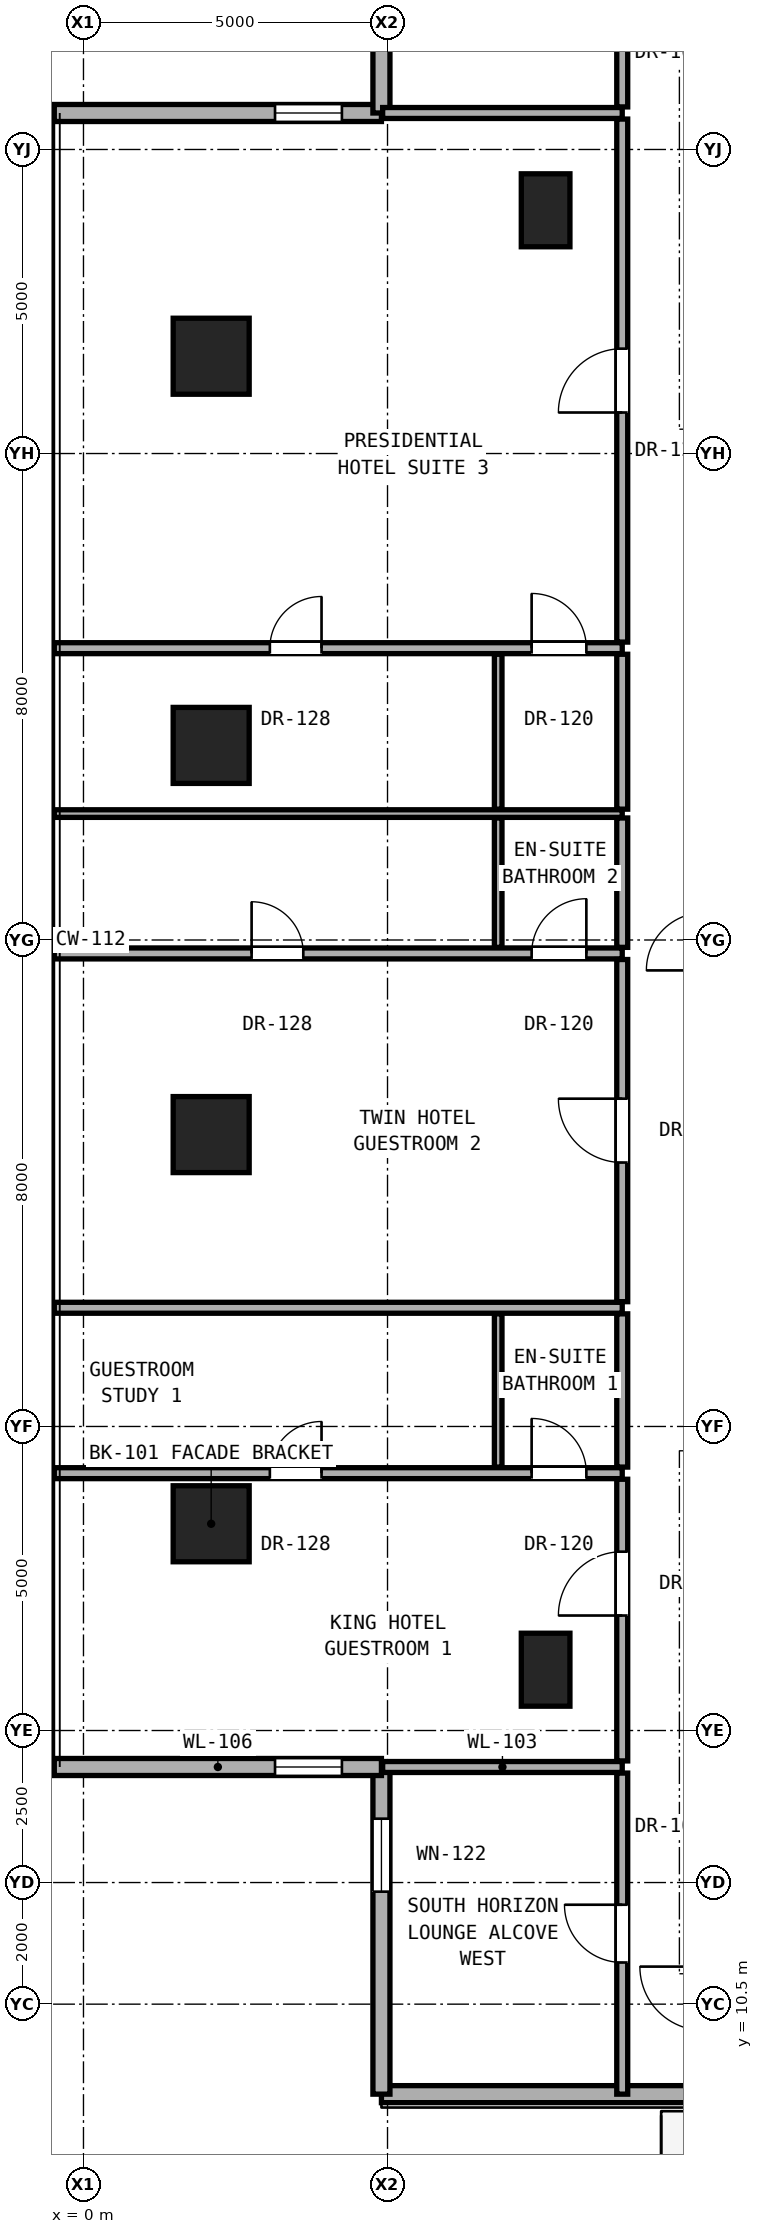
"""IFC4 building model, lengths in metres.
Left out: names, types, materials, properties, quantities, classifications, styles, units other than length and angle.
Written with IfcOpenShell. Run it as: python <this file> out.ifc"""

import sys

from ifc_helpers import new_model, si_unit, direction, frame, frame_2d, origin, origin_2d, place, context, subcontext, project, spatial, rectangle, hollow_rectangle, extrude, element, fill, save


model = new_model("IFC4")
c1 = context("Model", 3, precision=1e-05, world=origin(), true_north=direction((0.0, 1.0)))
c2 = subcontext(c1, "Body", "Model", "MODEL_VIEW")
j1 = project(units=[si_unit("LENGTHUNIT", "METRE"), si_unit("PLANEANGLEUNIT", "RADIAN")], contexts=[c1])
p1 = place(None, origin())
s1 = spatial("IfcSite", under=j1, at=p1, CompositionType="ELEMENT")
p2 = place(p1, origin())
s2 = spatial("IfcBuilding", under=s1, at=p2, CompositionType="ELEMENT")
p3 = place(p2, frame((0.0, 0.0, 22.4)))
s3 = spatial("IfcBuildingStorey", under=s2, at=p3, CompositionType="ELEMENT", Elevation=22.4)
for number, where, z_axis, x_axis in (
    (1, (2.1, 18.4, 0.0), (0.0, 0.0, 1.0), (1.0, 0.0, 0.0)),
    (2, (2.1, 24.8, 0.0), (0.0, 0.0, 1.0), (1.0, 0.0, 0.0)),
    (3, (2.1, 31.2, 0.0), (0.0, 0.0, 1.0), (1.0, 0.0, 0.0)),
    (4, (2.1, 37.6, 0.0), (0.0, 0.0, 1.0), (1.0, 0.0, 0.0)),
):
    element("IfcColumn", number, at=place(p3, frame(where, z_axis=z_axis, x_axis=x_axis)), inside=s3, PredefinedType="COLUMN", context=c2, shape_type="SweptSolid", body=[
        extrude(hollow_rectangle(XDim=1.25, YDim=1.25, WallThickness=0.07, at=origin_2d()), origin(), (0.0, 0.0, 1.0), 3.3),
    ])
for number, where, z_axis, x_axis in (
    (5, (7.6, 16.0, 0.0), (0.0, 0.0, 1.0), (1.0, 0.0, 0.0)),
    (6, (7.6, 40.0, 0.0), (0.0, 0.0, 1.0), (1.0, 0.0, 0.0)),
):
    element("IfcColumn", number, at=place(p3, frame(where, z_axis=z_axis, x_axis=x_axis)), inside=s3, PredefinedType="PILASTER", context=c2, shape_type="SweptSolid", body=[
        extrude(rectangle(XDim=0.8, YDim=1.2, at=origin_2d()), origin(), (0.0, 0.0, 1.0), 3.3),
    ])
p4 = place(p3, frame((17.7, 9.02, 0.0), z_axis=(0.0, 0.0, 1.0), x_axis=(-1.0, 0.0, 0.0)))
e7 = element("IfcWall", 7, at=p4, inside=s3, PredefinedType="SOLIDWALL", context=c2, shape_type="SweptSolid", body=[
    extrude(rectangle(XDim=12.8, YDim=0.28, at=frame_2d((6.4, 0.0))), origin(), (0.0, 0.0, 1.0), 3.04),
])
p5 = place(p4, frame((1.4, 0.0, 0.0)))
e8 = element("IfcOpeningElement", 8, at=p5, cuts=e7, PredefinedType="OPENING", context=c2, shape_type="SweptSolid", body=[
    extrude(rectangle(XDim=1.0, YDim=2.15, at=frame_2d((0.5, 1.075))), frame((0.0, 0.15, 0.0), z_axis=(0.0, -1.0, 0.0), x_axis=(1.0, 0.0, 0.0)), (0.0, 0.0, 1.0), 0.3),
])
p6 = place(p3, frame((4.9, 14.4, 0.0), z_axis=(0.0, 0.0, 1.0), x_axis=(0.0, -1.0, 0.0)))
e9 = element("IfcWall", 9, at=p6, inside=s3, PredefinedType="SOLIDWALL", context=c2, shape_type="SweptSolid", body=[
    extrude(rectangle(XDim=5.38, YDim=0.28, at=frame_2d((2.69, 0.0))), origin(), (0.0, 0.0, 1.0), 3.04),
])
p7 = place(p6, frame((0.85, 0.0, 0.79)))
e10 = element("IfcOpeningElement", 10, at=p7, cuts=e9, PredefinedType="OPENING", context=c2, shape_type="SweptSolid", body=[
    extrude(rectangle(XDim=1.2, YDim=2.1, at=frame_2d((0.6, 1.05))), frame((0.0, 0.15, 0.0), z_axis=(0.0, -1.0, 0.0), x_axis=(1.0, 0.0, 0.0)), (0.0, 0.0, 1.0), 0.3),
])
p8 = place(p3, frame((-0.48, 14.4, 0.0), z_axis=(0.0, 0.0, 1.0), x_axis=(1.0, 0.0, 0.0)))
e11 = element("IfcWall", 11, at=p8, inside=s3, PredefinedType="SOLIDWALL", context=c2, shape_type="SweptSolid", body=[
    extrude(rectangle(XDim=5.38, YDim=0.28, at=frame_2d((2.69, 0.0))), origin(), (0.0, 0.0, 1.0), 3.04),
])
p9 = place(p8, frame((3.63, 0.0, 0.85)))
e12 = element("IfcOpeningElement", 12, at=p9, cuts=e11, PredefinedType="OPENING", context=c2, shape_type="SweptSolid", body=[
    extrude(rectangle(XDim=1.1, YDim=2.0, at=frame_2d((0.55, 1.0))), frame((0.0, 0.15, 0.0), z_axis=(0.0, -1.0, 0.0), x_axis=(1.0, 0.0, 0.0)), (0.0, 0.0, 1.0), 0.3),
])
p10 = place(p3, frame((4.9, 41.6, 0.0), z_axis=(0.0, 0.0, 1.0), x_axis=(-1.0, 0.0, 0.0)))
e13 = element("IfcWall", 13, at=p10, inside=s3, PredefinedType="SOLIDWALL", context=c2, shape_type="SweptSolid", body=[
    extrude(rectangle(XDim=5.38, YDim=0.28, at=frame_2d((2.69, 0.0))), origin(), (0.0, 0.0, 1.0), 3.04),
])
p11 = place(p10, frame((0.65, 0.0, 0.85)))
e14 = element("IfcOpeningElement", 14, at=p11, cuts=e13, PredefinedType="OPENING", context=c2, shape_type="SweptSolid", body=[
    extrude(rectangle(XDim=1.1, YDim=2.0, at=frame_2d((0.55, 1.0))), frame((0.0, 0.15, 0.0), z_axis=(0.0, -1.0, 0.0), x_axis=(1.0, 0.0, 0.0)), (0.0, 0.0, 1.0), 0.3),
])
p12 = place(p3, frame((4.9, 46.98, 0.0), z_axis=(0.0, 0.0, 1.0), x_axis=(0.0, -1.0, 0.0)))
e15 = element("IfcWall", 15, at=p12, inside=s3, PredefinedType="SOLIDWALL", context=c2, shape_type="SweptSolid", body=[
    extrude(rectangle(XDim=5.38, YDim=0.28, at=frame_2d((2.69, 0.0))), origin(), (0.0, 0.0, 1.0), 3.04),
])
p13 = place(p3, frame((4.92, 14.4, 0.0), z_axis=(0.0, 0.0, 1.0), x_axis=(1.0, 0.0, 0.0)))
e16 = element("IfcWall", 16, at=p13, inside=s3, PredefinedType="PARTITIONING", context=c2, shape_type="SweptSolid", body=[
    extrude(rectangle(XDim=3.94, YDim=0.18, at=frame_2d((1.97, 0.0))), origin(), (0.0, 0.0, 1.0), 3.06),
])
p14 = place(p3, frame((-0.48, 19.232, 0.0), z_axis=(0.0, 0.0, 1.0), x_axis=(1.0, 0.0, 0.0)))
e17 = element("IfcWall", 17, at=p14, inside=s3, PredefinedType="PARTITIONING", context=c2, shape_type="SweptSolid", body=[
    extrude(rectangle(XDim=9.34, YDim=0.18, at=frame_2d((4.67, 0.0))), origin(), (0.0, 0.0, 1.0), 2.125),
])
p15 = place(p14, frame((3.545, 0.0, 0.0)))
e18 = element("IfcOpeningElement", 18, at=p15, cuts=e17, PredefinedType="OPENING", context=c2, shape_type="SweptSolid", body=[
    extrude(rectangle(XDim=0.85, YDim=2.01, at=frame_2d((0.425, 1.005))), frame((0.0, 0.1, 0.0), z_axis=(0.0, -1.0, 0.0), x_axis=(1.0, 0.0, 0.0)), (0.0, 0.0, 1.0), 0.2),
])
p16 = place(p14, frame((7.85, 0.0, 0.0)))
e19 = element("IfcOpeningElement", 19, at=p16, cuts=e17, PredefinedType="OPENING", context=c2, shape_type="SweptSolid", body=[
    extrude(rectangle(XDim=0.9, YDim=2.1, at=frame_2d((0.45, 1.05))), frame((0.0, 0.1, 0.0), z_axis=(0.0, -1.0, 0.0), x_axis=(1.0, 0.0, 0.0)), (0.0, 0.0, 1.0), 0.2),
])
p17 = place(p3, frame((-0.48, 21.952, 0.0), z_axis=(0.0, 0.0, 1.0), x_axis=(1.0, 0.0, 0.0)))
e20 = element("IfcWall", 20, at=p17, inside=s3, PredefinedType="PARTITIONING", context=c2, shape_type="SweptSolid", body=[
    extrude(rectangle(XDim=9.34, YDim=0.18, at=frame_2d((4.67, 0.0))), origin(), (0.0, 0.0, 1.0), 2.125),
])
p18 = place(p3, frame((-0.48, 27.779, 0.0), z_axis=(0.0, 0.0, 1.0), x_axis=(1.0, 0.0, 0.0)))
e21 = element("IfcWall", 21, at=p18, inside=s3, PredefinedType="PARTITIONING", context=c2, shape_type="SweptSolid", body=[
    extrude(rectangle(XDim=9.34, YDim=0.18, at=frame_2d((4.67, 0.0))), origin(), (0.0, 0.0, 1.0), 2.125),
])
p19 = place(p18, frame((3.245, 0.0, 0.0)))
e22 = element("IfcOpeningElement", 22, at=p19, cuts=e21, PredefinedType="OPENING", context=c2, shape_type="SweptSolid", body=[
    extrude(rectangle(XDim=0.85, YDim=2.01, at=frame_2d((0.425, 1.005))), frame((0.0, 0.1, 0.0), z_axis=(0.0, -1.0, 0.0), x_axis=(1.0, 0.0, 0.0)), (0.0, 0.0, 1.0), 0.2),
])
p20 = place(p18, frame((7.85, 0.0, 0.0)))
e23 = element("IfcOpeningElement", 23, at=p20, cuts=e21, PredefinedType="OPENING", context=c2, shape_type="SweptSolid", body=[
    extrude(rectangle(XDim=0.9, YDim=2.1, at=frame_2d((0.45, 1.05))), frame((0.0, 0.1, 0.0), z_axis=(0.0, -1.0, 0.0), x_axis=(1.0, 0.0, 0.0)), (0.0, 0.0, 1.0), 0.2),
])
p21 = place(p3, frame((-0.48, 30.079, 0.0), z_axis=(0.0, 0.0, 1.0), x_axis=(1.0, 0.0, 0.0)))
e24 = element("IfcWall", 24, at=p21, inside=s3, PredefinedType="PARTITIONING", context=c2, shape_type="SweptSolid", body=[
    extrude(rectangle(XDim=9.34, YDim=0.125, at=frame_2d((4.67, 0.0))), origin(), (0.0, 0.0, 1.0), 2.125),
])
p22 = place(p3, frame((-0.48, 32.799, 0.0), z_axis=(0.0, 0.0, 1.0), x_axis=(1.0, 0.0, 0.0)))
e25 = element("IfcWall", 25, at=p22, inside=s3, PredefinedType="PARTITIONING", context=c2, shape_type="SweptSolid", body=[
    extrude(rectangle(XDim=9.34, YDim=0.18, at=frame_2d((4.67, 0.0))), origin(), (0.0, 0.0, 1.0), 2.125),
])
p23 = place(p22, frame((3.545, 0.0, 0.0)))
e26 = element("IfcOpeningElement", 26, at=p23, cuts=e25, PredefinedType="OPENING", context=c2, shape_type="SweptSolid", body=[
    extrude(rectangle(XDim=0.85, YDim=2.01, at=frame_2d((0.425, 1.005))), frame((0.0, 0.1, 0.0), z_axis=(0.0, -1.0, 0.0), x_axis=(1.0, 0.0, 0.0)), (0.0, 0.0, 1.0), 0.2),
])
p24 = place(p22, frame((7.85, 0.0, 0.0)))
e27 = element("IfcOpeningElement", 27, at=p24, cuts=e25, PredefinedType="OPENING", context=c2, shape_type="SweptSolid", body=[
    extrude(rectangle(XDim=0.9, YDim=2.1, at=frame_2d((0.45, 1.05))), frame((0.0, 0.1, 0.0), z_axis=(0.0, -1.0, 0.0), x_axis=(1.0, 0.0, 0.0)), (0.0, 0.0, 1.0), 0.2),
])
p25 = place(p3, frame((4.92, 41.6, 0.0), z_axis=(0.0, 0.0, 1.0), x_axis=(1.0, 0.0, 0.0)))
e28 = element("IfcWall", 28, at=p25, inside=s3, PredefinedType="PARTITIONING", context=c2, shape_type="SweptSolid", body=[
    extrude(rectangle(XDim=3.94, YDim=0.18, at=frame_2d((1.97, 0.0))), origin(), (0.0, 0.0, 1.0), 3.06),
])
p26 = place(p3, frame((6.82, 19.332, 0.0), z_axis=(0.0, 0.0, 1.0), x_axis=(0.0, 1.0, 0.0)))
e29 = element("IfcWall", 29, at=p26, inside=s3, PredefinedType="PARTITIONING", context=c2, shape_type="SweptSolid", body=[
    extrude(rectangle(XDim=2.52, YDim=0.125, at=frame_2d((1.26, 0.0))), origin(), (0.0, 0.0, 1.0), 3.06),
])
p27 = place(p3, frame((6.82, 27.879, 0.0), z_axis=(0.0, 0.0, 1.0), x_axis=(0.0, 1.0, 0.0)))
e30 = element("IfcWall", 30, at=p27, inside=s3, PredefinedType="PARTITIONING", context=c2, shape_type="SweptSolid", body=[
    extrude(rectangle(XDim=2.128, YDim=0.125, at=frame_2d((1.064, 0.0))), origin(), (0.0, 0.0, 1.0), 3.06),
])
p28 = place(p3, frame((6.82, 30.152, 0.0), z_axis=(0.0, 0.0, 1.0), x_axis=(0.0, 1.0, 0.0)))
e31 = element("IfcWall", 31, at=p28, inside=s3, PredefinedType="PARTITIONING", context=c2, shape_type="SweptSolid", body=[
    extrude(rectangle(XDim=2.547, YDim=0.125, at=frame_2d((1.274, 0.0))), origin(), (0.0, 0.0, 1.0), 2.279),
])
p29 = place(p3, frame((8.86, 9.02, 0.0), z_axis=(0.0, 0.0, 1.0), x_axis=(0.0, 1.0, 0.0)))
e32 = element("IfcWall", 32, at=p29, inside=s3, PredefinedType="PARTITIONING", context=c2, shape_type="SweptSolid", body=[
    extrude(rectangle(XDim=5.28, YDim=0.18, at=frame_2d((2.64, 0.0))), origin(), (0.0, 0.0, 1.0), 3.06),
])
p30 = place(p29, frame((2.165, 0.0, 0.0)))
e33 = element("IfcOpeningElement", 33, at=p30, cuts=e32, PredefinedType="OPENING", context=c2, shape_type="SweptSolid", body=[
    extrude(rectangle(XDim=0.95, YDim=2.15, at=frame_2d((0.475, 1.075))), frame((0.0, 0.1, 0.0), z_axis=(0.0, -1.0, 0.0), x_axis=(1.0, 0.0, 0.0)), (0.0, 0.0, 1.0), 0.2),
])
p31 = place(p3, frame((8.86, 14.5, 0.0), z_axis=(0.0, 0.0, 1.0), x_axis=(0.0, 1.0, 0.0)))
e34 = element("IfcWall", 34, at=p31, inside=s3, PredefinedType="PARTITIONING", context=c2, shape_type="SweptSolid", body=[
    extrude(rectangle(XDim=4.632, YDim=0.18, at=frame_2d((2.316, 0.0))), origin(), (0.0, 0.0, 1.0), 2.436),
])
p32 = place(p31, frame((2.391, 0.0, 0.0)))
e35 = element("IfcOpeningElement", 35, at=p32, cuts=e34, PredefinedType="OPENING", context=c2, shape_type="SweptSolid", body=[
    extrude(rectangle(XDim=1.05, YDim=2.2, at=frame_2d((0.525, 1.1))), frame((0.0, 0.1, 0.0), z_axis=(0.0, -1.0, 0.0), x_axis=(1.0, 0.0, 0.0)), (0.0, 0.0, 1.0), 0.2),
])
p33 = place(p3, frame((8.86, 19.332, 0.0), z_axis=(0.0, 0.0, 1.0), x_axis=(0.0, 1.0, 0.0)))
e36 = element("IfcWall", 36, at=p33, inside=s3, PredefinedType="PARTITIONING", context=c2, shape_type="SweptSolid", body=[
    extrude(rectangle(XDim=2.52, YDim=0.18, at=frame_2d((1.26, 0.0))), origin(), (0.0, 0.0, 1.0), 3.06),
])
p34 = place(p3, frame((8.86, 22.052, 0.0), z_axis=(0.0, 0.0, 1.0), x_axis=(0.0, 1.0, 0.0)))
e37 = element("IfcWall", 37, at=p34, inside=s3, PredefinedType="PARTITIONING", context=c2, shape_type="SweptSolid", body=[
    extrude(rectangle(XDim=5.627, YDim=0.18, at=frame_2d((2.813, 0.0))), origin(), (0.0, 0.0, 1.0), 2.279),
])
p35 = place(p34, frame((2.289, 0.0, 0.0)))
e38 = element("IfcOpeningElement", 38, at=p35, cuts=e37, PredefinedType="OPENING", context=c2, shape_type="SweptSolid", body=[
    extrude(rectangle(XDim=1.05, YDim=2.2, at=frame_2d((0.525, 1.1))), frame((0.0, 0.1, 0.0), z_axis=(0.0, -1.0, 0.0), x_axis=(1.0, 0.0, 0.0)), (0.0, 0.0, 1.0), 0.2),
])
p36 = place(p3, frame((8.86, 27.879, 0.0), z_axis=(0.0, 0.0, 1.0), x_axis=(0.0, 1.0, 0.0)))
e39 = element("IfcWall", 39, at=p36, inside=s3, PredefinedType="PARTITIONING", context=c2, shape_type="SweptSolid", body=[
    extrude(rectangle(XDim=2.128, YDim=0.18, at=frame_2d((1.064, 0.0))), origin(), (0.0, 0.0, 1.0), 3.06),
])
p37 = place(p3, frame((8.86, 30.152, 0.0), z_axis=(0.0, 0.0, 1.0), x_axis=(0.0, 1.0, 0.0)))
e40 = element("IfcWall", 40, at=p37, inside=s3, PredefinedType="PARTITIONING", context=c2, shape_type="SweptSolid", body=[
    extrude(rectangle(XDim=2.547, YDim=0.18, at=frame_2d((1.274, 0.0))), origin(), (0.0, 0.0, 1.0), 2.279),
])
p38 = place(p3, frame((8.86, 32.899, 0.0), z_axis=(0.0, 0.0, 1.0), x_axis=(0.0, 1.0, 0.0)))
e41 = element("IfcWall", 41, at=p38, inside=s3, PredefinedType="PARTITIONING", context=c2, shape_type="SweptSolid", body=[
    extrude(rectangle(XDim=8.601, YDim=0.18, at=frame_2d((4.301, 0.0))), origin(), (0.0, 0.0, 1.0), 2.436),
])
p39 = place(p38, frame((3.775, 0.0, 0.0)))
e42 = element("IfcOpeningElement", 42, at=p39, cuts=e41, PredefinedType="OPENING", context=c2, shape_type="SweptSolid", body=[
    extrude(rectangle(XDim=1.05, YDim=2.2, at=frame_2d((0.525, 1.1))), frame((0.0, 0.1, 0.0), z_axis=(0.0, -1.0, 0.0), x_axis=(1.0, 0.0, 0.0)), (0.0, 0.0, 1.0), 0.2),
])
p40 = place(p3, frame((8.86, 41.7, 0.0), z_axis=(0.0, 0.0, 1.0), x_axis=(0.0, 1.0, 0.0)))
e43 = element("IfcWall", 43, at=p40, inside=s3, PredefinedType="PARTITIONING", context=c2, shape_type="SweptSolid", body=[
    extrude(rectangle(XDim=5.28, YDim=0.18, at=frame_2d((2.64, 0.0))), origin(), (0.0, 0.0, 1.0), 3.06),
])
p41 = place(p40, frame((2.165, 0.0, 0.0)))
e44 = element("IfcOpeningElement", 44, at=p41, cuts=e43, PredefinedType="OPENING", context=c2, shape_type="SweptSolid", body=[
    extrude(rectangle(XDim=0.95, YDim=2.15, at=frame_2d((0.475, 1.075))), frame((0.0, 0.1, 0.0), z_axis=(0.0, -1.0, 0.0), x_axis=(1.0, 0.0, 0.0)), (0.0, 0.0, 1.0), 0.2),
])
p42 = place(p7, origin())
e45 = element("IfcWindow", 45, at=p42, inside=s3, PartitioningType="SINGLE_PANEL", PredefinedType="WINDOW", context=c2, shape_type="SweptSolid", body=[
    extrude(rectangle(XDim=1.2, YDim=2.1, at=frame_2d((0.6, 1.05))), frame((0.0, 0.03, 0.0), z_axis=(0.0, -1.0, 0.0), x_axis=(1.0, 0.0, 0.0)), (0.0, 0.0, 1.0), 0.06),
])
fill(e10, e45)
p43 = place(p9, origin())
e46 = element("IfcWindow", 46, at=p43, inside=s3, PartitioningType="SINGLE_PANEL", PredefinedType="WINDOW", context=c2, shape_type="SweptSolid", body=[
    extrude(rectangle(XDim=1.1, YDim=2.0, at=frame_2d((0.55, 1.0))), frame((0.0, 0.03, 0.0), z_axis=(0.0, -1.0, 0.0), x_axis=(1.0, 0.0, 0.0)), (0.0, 0.0, 1.0), 0.06),
])
fill(e12, e46)
p44 = place(p11, origin())
e47 = element("IfcWindow", 47, at=p44, inside=s3, PartitioningType="SINGLE_PANEL", PredefinedType="WINDOW", context=c2, shape_type="SweptSolid", body=[
    extrude(rectangle(XDim=1.1, YDim=2.0, at=frame_2d((0.55, 1.0))), frame((0.0, 0.03, 0.0), z_axis=(0.0, -1.0, 0.0), x_axis=(1.0, 0.0, 0.0)), (0.0, 0.0, 1.0), 0.06),
])
fill(e14, e47)
p45 = place(p32, origin())
e48 = element("IfcDoor", 48, at=p45, inside=s3, OperationType="SINGLE_SWING_LEFT", PredefinedType="DOOR", context=c2, shape_type="SweptSolid", body=[
    extrude(rectangle(XDim=1.05, YDim=2.2, at=frame_2d((0.525, 1.1))), frame((0.0, 0.025, 0.0), z_axis=(0.0, -1.0, 0.0), x_axis=(1.0, 0.0, 0.0)), (0.0, 0.0, 1.0), 0.05),
])
fill(e35, e48)
p46 = place(p15, origin())
e49 = element("IfcDoor", 49, at=p46, inside=s3, OperationType="SINGLE_SWING_RIGHT", PredefinedType="DOOR", context=c2, shape_type="SweptSolid", body=[
    extrude(rectangle(XDim=0.85, YDim=2.01, at=frame_2d((0.425, 1.005))), frame((0.0, 0.025, 0.0), z_axis=(0.0, -1.0, 0.0), x_axis=(1.0, 0.0, 0.0)), (0.0, 0.0, 1.0), 0.05),
])
fill(e18, e49)
p47 = place(p16, origin())
e50 = element("IfcDoor", 50, at=p47, inside=s3, OperationType="SINGLE_SWING_LEFT", PredefinedType="DOOR", context=c2, shape_type="SweptSolid", body=[
    extrude(rectangle(XDim=0.9, YDim=2.1, at=frame_2d((0.45, 1.05))), frame((0.0, 0.025, 0.0), z_axis=(0.0, -1.0, 0.0), x_axis=(1.0, 0.0, 0.0)), (0.0, 0.0, 1.0), 0.05),
])
fill(e19, e50)
p48 = place(p35, origin())
e51 = element("IfcDoor", 51, at=p48, inside=s3, OperationType="SINGLE_SWING_RIGHT", PredefinedType="DOOR", context=c2, shape_type="SweptSolid", body=[
    extrude(rectangle(XDim=1.05, YDim=2.2, at=frame_2d((0.525, 1.1))), frame((0.0, 0.025, 0.0), z_axis=(0.0, -1.0, 0.0), x_axis=(1.0, 0.0, 0.0)), (0.0, 0.0, 1.0), 0.05),
])
fill(e38, e51)
p49 = place(p19, origin())
e52 = element("IfcDoor", 52, at=p49, inside=s3, OperationType="SINGLE_SWING_LEFT", PredefinedType="DOOR", context=c2, shape_type="SweptSolid", body=[
    extrude(rectangle(XDim=0.85, YDim=2.01, at=frame_2d((0.425, 1.005))), frame((0.0, 0.025, 0.0), z_axis=(0.0, -1.0, 0.0), x_axis=(1.0, 0.0, 0.0)), (0.0, 0.0, 1.0), 0.05),
])
fill(e22, e52)
p50 = place(p20, origin())
e53 = element("IfcDoor", 53, at=p50, inside=s3, OperationType="SINGLE_SWING_RIGHT", PredefinedType="DOOR", context=c2, shape_type="SweptSolid", body=[
    extrude(rectangle(XDim=0.9, YDim=2.1, at=frame_2d((0.45, 1.05))), frame((0.0, 0.025, 0.0), z_axis=(0.0, -1.0, 0.0), x_axis=(1.0, 0.0, 0.0)), (0.0, 0.0, 1.0), 0.05),
])
fill(e23, e53)
p51 = place(p39, origin())
e54 = element("IfcDoor", 54, at=p51, inside=s3, OperationType="SINGLE_SWING_LEFT", PredefinedType="DOOR", context=c2, shape_type="SweptSolid", body=[
    extrude(rectangle(XDim=1.05, YDim=2.2, at=frame_2d((0.525, 1.1))), frame((0.0, 0.025, 0.0), z_axis=(0.0, -1.0, 0.0), x_axis=(1.0, 0.0, 0.0)), (0.0, 0.0, 1.0), 0.05),
])
fill(e42, e54)
p52 = place(p23, origin())
e55 = element("IfcDoor", 55, at=p52, inside=s3, OperationType="SINGLE_SWING_RIGHT", PredefinedType="DOOR", context=c2, shape_type="SweptSolid", body=[
    extrude(rectangle(XDim=0.85, YDim=2.01, at=frame_2d((0.425, 1.005))), frame((0.0, 0.025, 0.0), z_axis=(0.0, -1.0, 0.0), x_axis=(1.0, 0.0, 0.0)), (0.0, 0.0, 1.0), 0.05),
])
fill(e26, e55)
p53 = place(p24, origin())
e56 = element("IfcDoor", 56, at=p53, inside=s3, OperationType="SINGLE_SWING_LEFT", PredefinedType="DOOR", context=c2, shape_type="SweptSolid", body=[
    extrude(rectangle(XDim=0.9, YDim=2.1, at=frame_2d((0.45, 1.05))), frame((0.0, 0.025, 0.0), z_axis=(0.0, -1.0, 0.0), x_axis=(1.0, 0.0, 0.0)), (0.0, 0.0, 1.0), 0.05),
])
fill(e27, e56)
p54 = place(p30, origin())
e57 = element("IfcDoor", 57, at=p54, inside=s3, OperationType="SINGLE_SWING_RIGHT", PredefinedType="DOOR", context=c2, shape_type="SweptSolid", body=[
    extrude(rectangle(XDim=0.95, YDim=2.15, at=frame_2d((0.475, 1.075))), frame((0.0, 0.025, 0.0), z_axis=(0.0, -1.0, 0.0), x_axis=(1.0, 0.0, 0.0)), (0.0, 0.0, 1.0), 0.05),
])
fill(e33, e57)
save(model, sys.argv[1])
